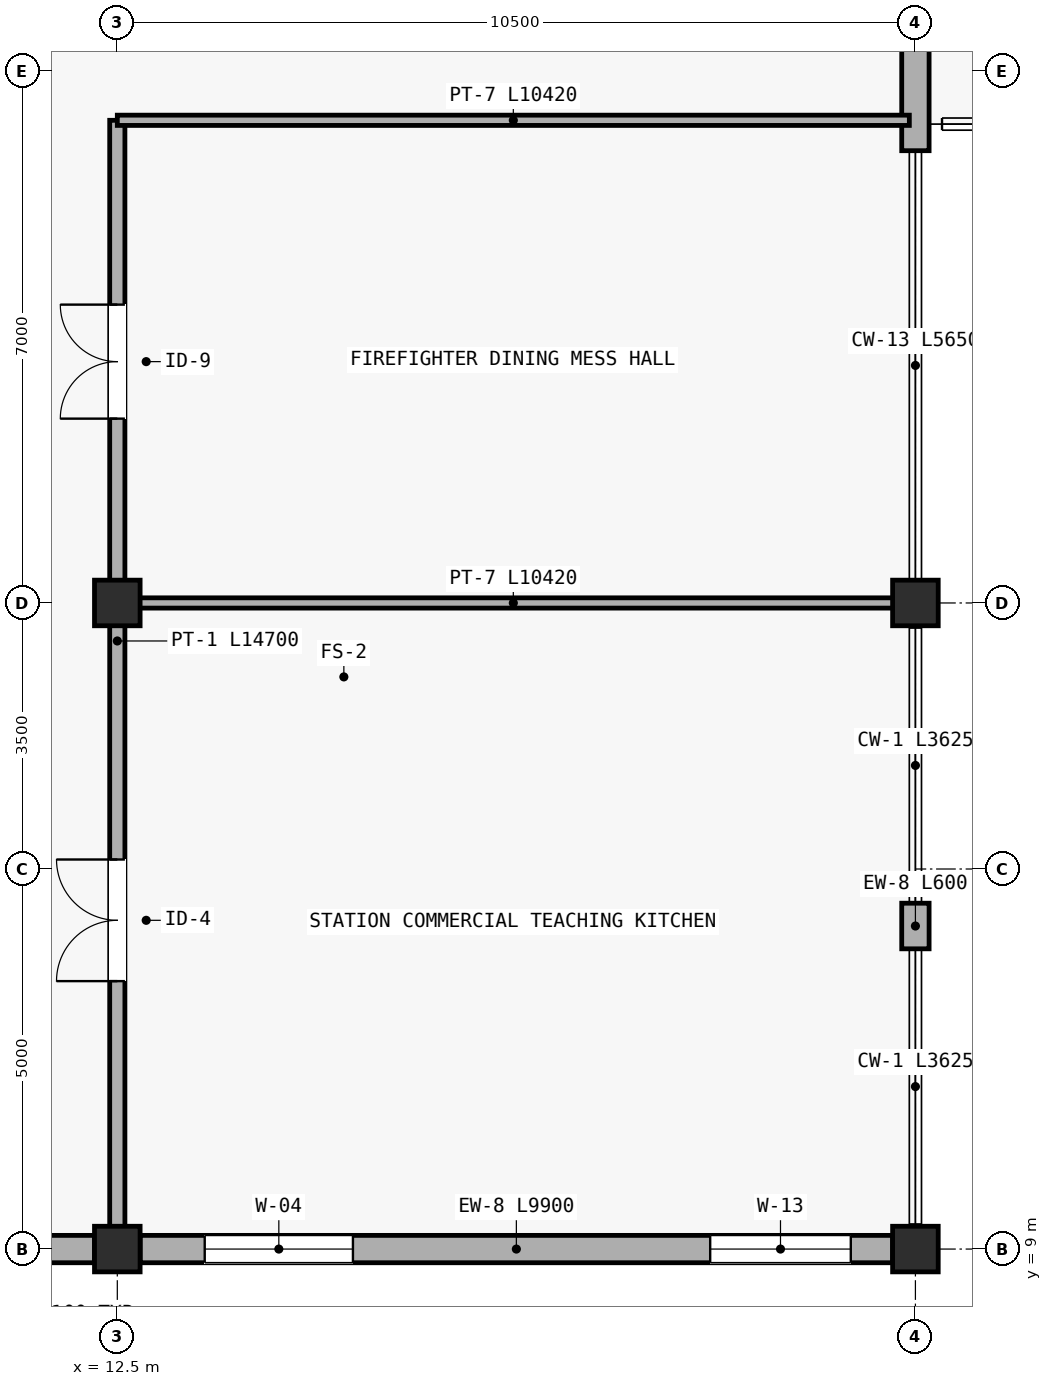
"""IFC4 building model, lengths in metres.
Left out: names, types, materials, properties, quantities, classifications, styles, units other than length and angle.
Written with IfcOpenShell. Run it as: python <this file> out.ifc"""

import sys

from ifc_helpers import new_model, si_unit, direction, frame, frame_2d, origin, origin_2d, place, context, subcontext, project, spatial, rectangle, extrude, element, fill, save


model = new_model("IFC4")
c1 = context("Model", 3, precision=1e-05, world=origin(), true_north=direction((0.0, 1.0)))
c2 = subcontext(c1, "Body", "Model", "MODEL_VIEW")
j1 = project(units=[si_unit("LENGTHUNIT", "METRE"), si_unit("PLANEANGLEUNIT", "RADIAN")], contexts=[c1])
p1 = place(None, origin())
s1 = spatial("IfcSite", under=j1, at=p1, CompositionType="ELEMENT")
p2 = place(p1, origin())
s2 = spatial("IfcBuilding", under=s1, at=p2, CompositionType="ELEMENT")
p3 = place(p2, frame((0.0, 0.0, 5.85)))
s3 = spatial("IfcBuildingStorey", under=s2, at=p3, CompositionType="ELEMENT", Elevation=5.85)
for number, where, z_axis, x_axis in (
    (1, (12.5, 9.0, 0.0), (0.0, 0.0, 1.0), (1.0, 0.0, 0.0)),
    (2, (12.5, 17.5, 0.0), (0.0, 0.0, 1.0), (1.0, 0.0, 0.0)),
    (3, (23.0, 9.0, 0.0), (0.0, 0.0, 1.0), (1.0, 0.0, 0.0)),
    (4, (23.0, 17.5, 0.0), (0.0, 0.0, 1.0), (1.0, 0.0, 0.0)),
):
    element("IfcColumn", number, at=place(p3, frame(where, z_axis=z_axis, x_axis=x_axis)), inside=s3, PredefinedType="COLUMN", context=c2, shape_type="SweptSolid", body=[
        extrude(rectangle(XDim=0.6, YDim=0.6, at=origin_2d()), origin(), (0.0, 0.0, 1.0), 3.45),
    ])
p4 = place(p3, frame((8.8, 9.0, 0.0), z_axis=(0.0, 0.0, 1.0), x_axis=(1.0, 0.0, 0.0)))
e5 = element("IfcWall", 5, at=p4, inside=s3, PredefinedType="STANDARD", context=c2, shape_type="SweptSolid", body=[
    extrude(rectangle(XDim=3.4, YDim=0.36, at=frame_2d((1.7, 0.0))), origin(), (0.0, 0.0, 1.0), 2.69),
])
p5 = place(p4, frame((0.85, 0.0, 0.75)))
e6 = element("IfcOpeningElement", 6, at=p5, cuts=e5, PredefinedType="OPENING", context=c2, shape_type="SweptSolid", body=[
    extrude(rectangle(XDim=1.95, YDim=1.35, at=frame_2d((0.975, 0.675))), frame((0.0, 0.19, 0.0), z_axis=(0.0, -1.0, 0.0), x_axis=(1.0, 0.0, 0.0)), (0.0, 0.0, 1.0), 0.38),
])
p6 = place(p3, frame((12.8, 9.0, 0.0), z_axis=(0.0, 0.0, 1.0), x_axis=(1.0, 0.0, 0.0)))
e7 = element("IfcWall", 7, at=p6, inside=s3, PredefinedType="STANDARD", context=c2, shape_type="SweptSolid", body=[
    extrude(rectangle(XDim=9.9, YDim=0.36, at=frame_2d((4.95, 0.0))), origin(), (0.0, 0.0, 1.0), 2.69),
])
p7 = place(p6, frame((0.85, 0.0, 0.75)))
e8 = element("IfcOpeningElement", 8, at=p7, cuts=e7, PredefinedType="OPENING", context=c2, shape_type="SweptSolid", body=[
    extrude(rectangle(XDim=1.95, YDim=1.35, at=frame_2d((0.975, 0.675))), frame((0.0, 0.19, 0.0), z_axis=(0.0, -1.0, 0.0), x_axis=(1.0, 0.0, 0.0)), (0.0, 0.0, 1.0), 0.38),
])
p8 = place(p6, frame((7.5, 0.0, 0.75)))
e9 = element("IfcOpeningElement", 9, at=p8, cuts=e7, PredefinedType="OPENING", context=c2, shape_type="SweptSolid", body=[
    extrude(rectangle(XDim=1.85, YDim=1.3, at=frame_2d((0.925, 0.65))), frame((0.0, 0.19, 0.0), z_axis=(0.0, -1.0, 0.0), x_axis=(1.0, 0.0, 0.0)), (0.0, 0.0, 1.0), 0.38),
])
p9 = place(p3, frame((23.0, 12.95, 0.0), z_axis=(0.0, 0.0, 1.0), x_axis=(0.0, 1.0, 0.0)))
e10 = element("IfcWall", 10, at=p9, inside=s3, PredefinedType="STANDARD", context=c2, shape_type="SweptSolid", body=[
    extrude(rectangle(XDim=0.6, YDim=0.36, at=frame_2d((0.3, 0.0))), origin(), (0.0, 0.0, 1.0), 2.75),
])
p10 = place(p3, frame((23.0, 23.45, 0.0), z_axis=(0.0, 0.0, 1.0), x_axis=(0.0, 1.0, 0.0)))
e11 = element("IfcWall", 11, at=p10, inside=s3, PredefinedType="STANDARD", context=c2, shape_type="SweptSolid", body=[
    extrude(rectangle(XDim=5.25, YDim=0.36, at=frame_2d((2.625, 0.0))), origin(), (0.0, 0.0, 1.0), 2.75),
])
p11 = place(p10, frame((1.35, 0.0, 0.0)))
e12 = element("IfcOpeningElement", 12, at=p11, cuts=e11, PredefinedType="OPENING", context=c2, shape_type="SweptSolid", body=[
    extrude(rectangle(XDim=1.75, YDim=2.2, at=frame_2d((0.875, 1.1))), frame((0.0, 0.19, 0.0), z_axis=(0.0, -1.0, 0.0), x_axis=(1.0, 0.0, 0.0)), (0.0, 0.0, 1.0), 0.38),
])
p12 = place(p3, frame((12.5, 9.15, 0.0), z_axis=(0.0, 0.0, 1.0), x_axis=(0.0, 1.0, 0.0)))
e13 = element("IfcWall", 13, at=p12, inside=s3, PredefinedType="PARTITIONING", context=c2, shape_type="SweptSolid", body=[
    extrude(rectangle(XDim=8.35, YDim=0.2, at=frame_2d((4.175, 0.0))), origin(), (0.0, 0.0, 1.0), 2.7),
])
p13 = place(p12, frame((3.375, 0.0, 0.0)))
e14 = element("IfcOpeningElement", 14, at=p13, cuts=e13, PredefinedType="OPENING", context=c2, shape_type="SweptSolid", body=[
    extrude(rectangle(XDim=1.6, YDim=2.14, at=frame_2d((0.8, 1.07))), frame((0.0, 0.11, 0.0), z_axis=(0.0, -1.0, 0.0), x_axis=(1.0, 0.0, 0.0)), (0.0, 0.0, 1.0), 0.22),
])
p14 = place(p3, frame((12.5, 17.5, 0.0), z_axis=(0.0, 0.0, 1.0), x_axis=(0.0, 1.0, 0.0)))
e15 = element("IfcWall", 15, at=p14, inside=s3, PredefinedType="PARTITIONING", context=c2, shape_type="SweptSolid", body=[
    extrude(rectangle(XDim=6.35, YDim=0.2, at=frame_2d((3.175, 0.0))), origin(), (0.0, 0.0, 1.0), 2.7),
])
p15 = place(p14, frame((2.425, 0.0, 0.0)))
e16 = element("IfcOpeningElement", 16, at=p15, cuts=e15, PredefinedType="OPENING", context=c2, shape_type="SweptSolid", body=[
    extrude(rectangle(XDim=1.5, YDim=2.15, at=frame_2d((0.75, 1.075))), frame((0.0, 0.11, 0.0), z_axis=(0.0, -1.0, 0.0), x_axis=(1.0, 0.0, 0.0)), (0.0, 0.0, 1.0), 0.22),
])
for number, where, z_axis, x_axis in (
    (17, (12.5, 17.5, 0.0), (0.0, 0.0, 1.0), (1.0, 0.0, 0.0)),
    (18, (12.5, 23.85, 0.0), (0.0, 0.0, 1.0), (1.0, 0.0, 0.0)),
):
    element("IfcWall", number, at=place(p3, frame(where, z_axis=z_axis, x_axis=x_axis)), inside=s3, PredefinedType="PARTITIONING", context=c2, shape_type="SweptSolid", body=[
        extrude(rectangle(XDim=10.42, YDim=0.135, at=frame_2d((5.21, 0.0))), origin(), (0.0, 0.0, 1.0), 2.7),
    ])
p16 = place(p7, origin())
e19 = element("IfcWindow", 19, at=p16, inside=s3, PartitioningType="DOUBLE_PANEL_HORIZONTAL", PredefinedType="WINDOW", context=c2, shape_type="SweptSolid", body=[
    extrude(rectangle(XDim=1.95, YDim=1.35, at=frame_2d((0.975, 0.675))), frame((0.0, 0.03, 0.0), z_axis=(0.0, -1.0, 0.0), x_axis=(1.0, 0.0, 0.0)), (0.0, 0.0, 1.0), 0.06),
])
fill(e8, e19)
p17 = place(p8, origin())
e20 = element("IfcWindow", 20, at=p17, inside=s3, PartitioningType="DOUBLE_PANEL_HORIZONTAL", PredefinedType="WINDOW", context=c2, shape_type="SweptSolid", body=[
    extrude(rectangle(XDim=1.85, YDim=1.3, at=frame_2d((0.925, 0.65))), frame((0.0, 0.03, 0.0), z_axis=(0.0, -1.0, 0.0), x_axis=(1.0, 0.0, 0.0)), (0.0, 0.0, 1.0), 0.06),
])
fill(e9, e20)
p18 = place(p13, origin())
e21 = element("IfcDoor", 21, at=p18, inside=s3, OperationType="DOUBLE_DOOR_SINGLE_SWING", PredefinedType="DOOR", context=c2, shape_type="SweptSolid", body=[
    extrude(rectangle(XDim=1.6, YDim=2.14, at=frame_2d((0.8, 1.07))), frame((0.0, 0.025, 0.0), z_axis=(0.0, -1.0, 0.0), x_axis=(1.0, 0.0, 0.0)), (0.0, 0.0, 1.0), 0.05),
])
fill(e14, e21)
p19 = place(p15, origin())
e22 = element("IfcDoor", 22, at=p19, inside=s3, OperationType="DOUBLE_DOOR_SINGLE_SWING", PredefinedType="DOOR", context=c2, shape_type="SweptSolid", body=[
    extrude(rectangle(XDim=1.5, YDim=2.15, at=frame_2d((0.75, 1.075))), frame((0.0, 0.025, 0.0), z_axis=(0.0, -1.0, 0.0), x_axis=(1.0, 0.0, 0.0)), (0.0, 0.0, 1.0), 0.05),
])
fill(e16, e22)
save(model, sys.argv[1])
